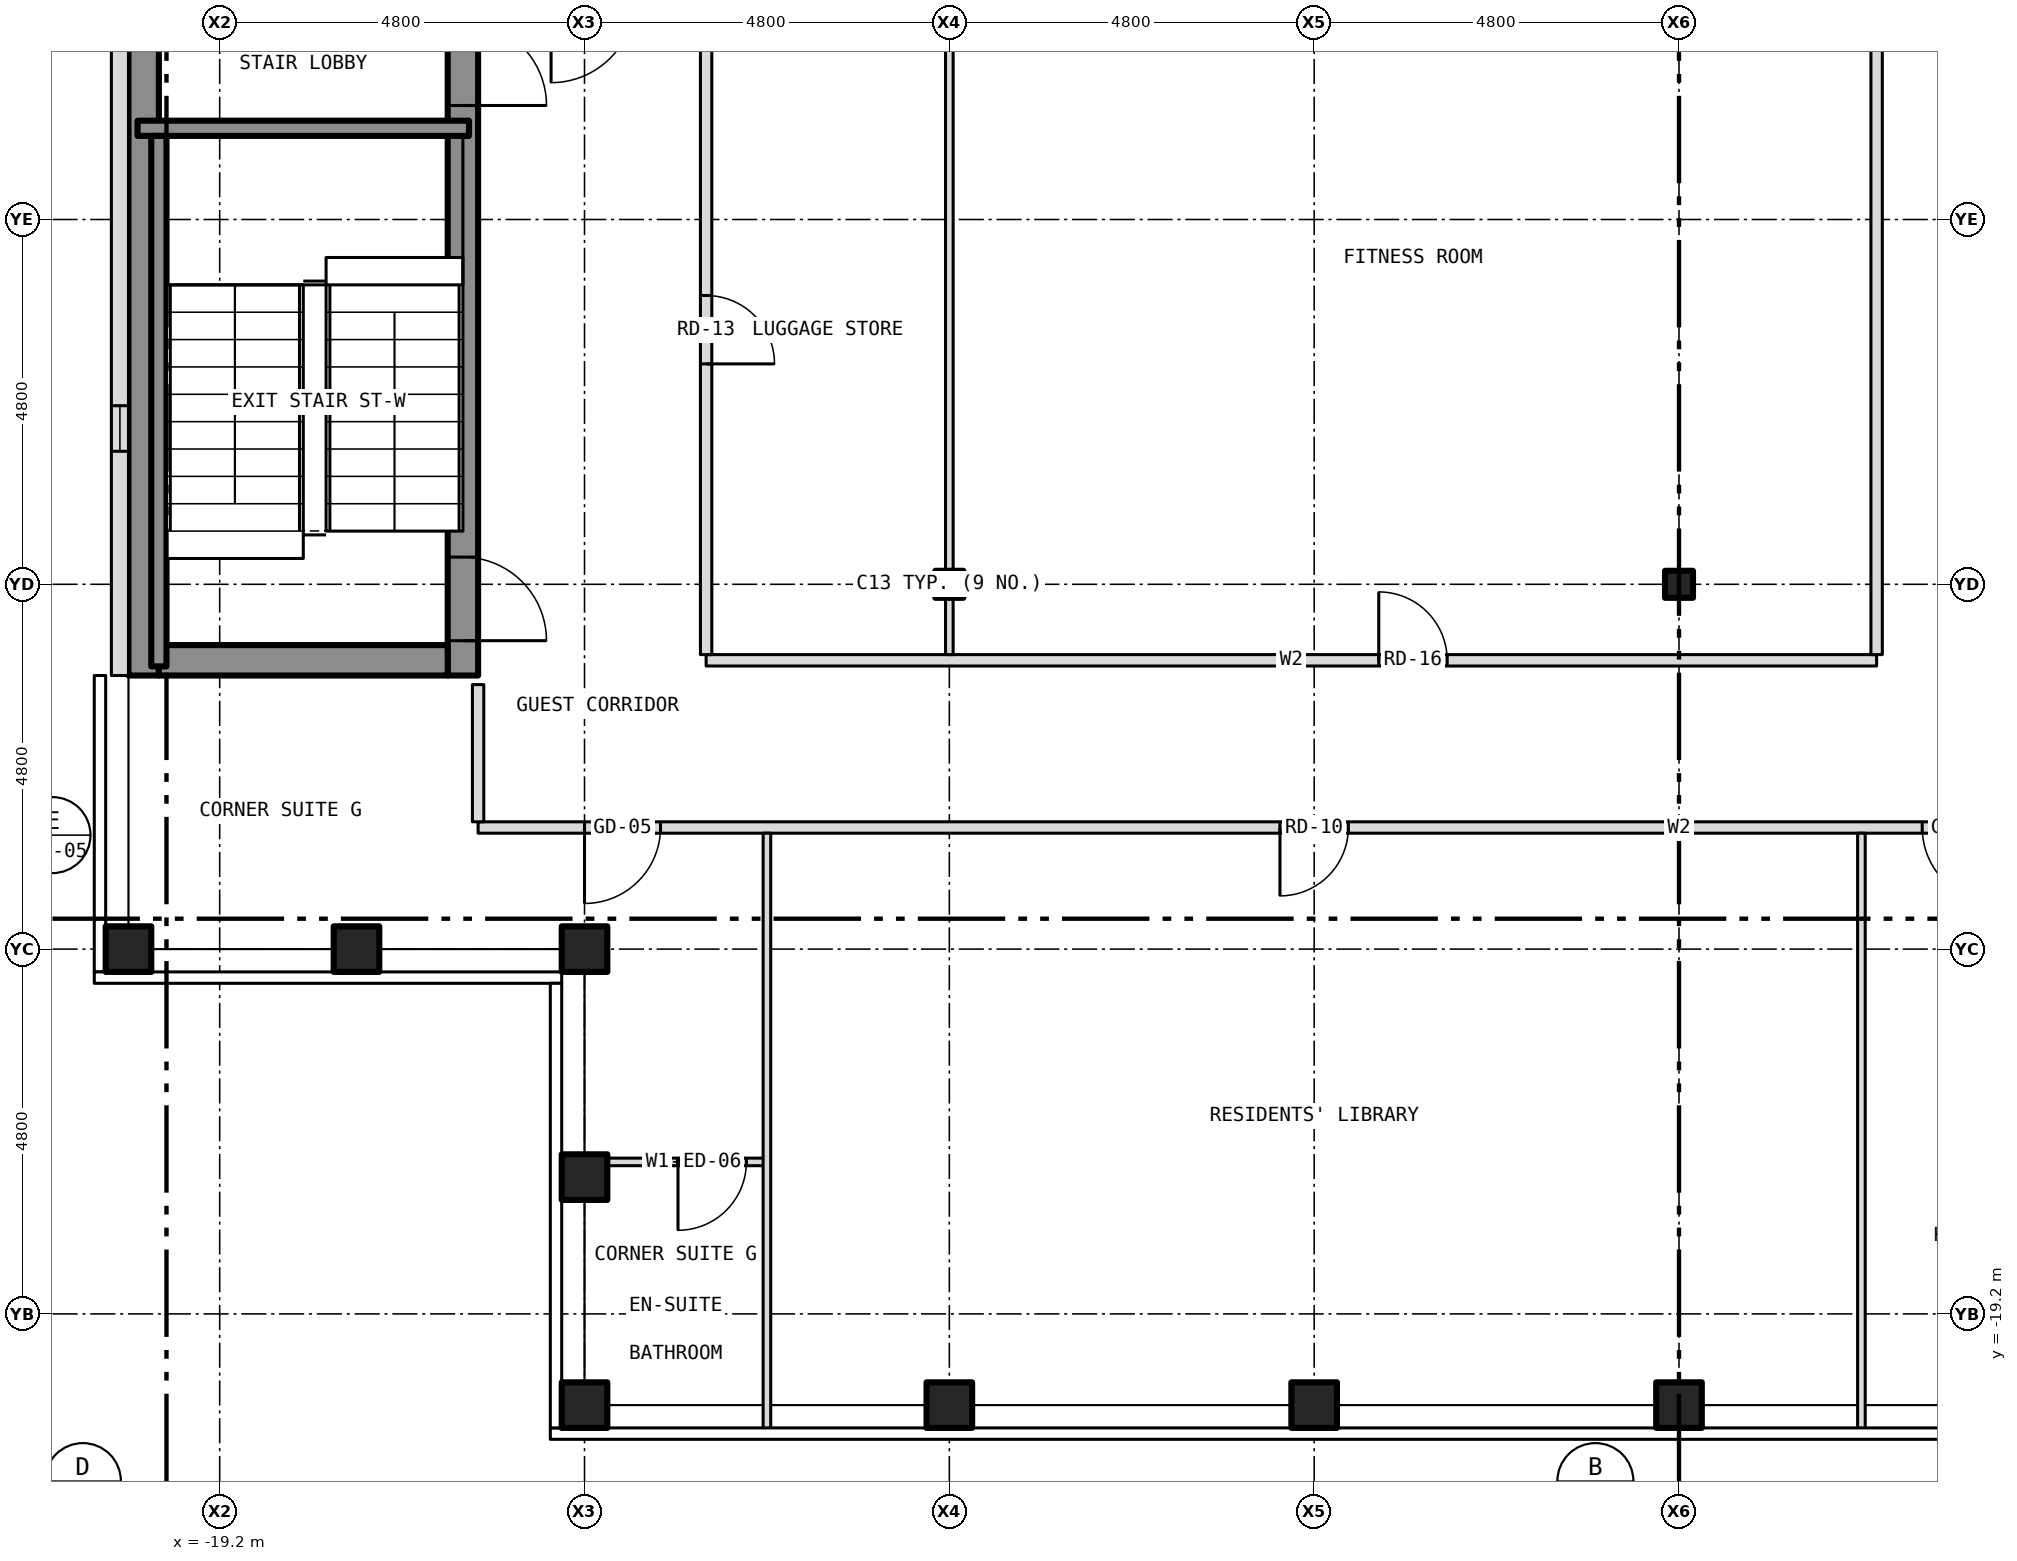
"""IFC4 building model, lengths in metres.
Left out: names, types, materials, properties, quantities, classifications, styles, units other than length and angle.
Written with IfcOpenShell. Run it as: python <this file> out.ifc"""

import sys

from ifc_helpers import new_model, si_unit, direction, frame, frame_2d, origin, origin_2d, place, context, subcontext, project, spatial, rectangle, hollow_rectangle, i_section, extrude, element, fill, save


model = new_model("IFC4")
c1 = context("Model", 3, precision=1e-05, world=origin(), true_north=direction((0.0, 1.0)))
c2 = subcontext(c1, "Body", "Model", "MODEL_VIEW")
j1 = project(units=[si_unit("LENGTHUNIT", "METRE"), si_unit("PLANEANGLEUNIT", "RADIAN")], contexts=[c1])
p1 = place(None, origin())
s1 = spatial("IfcSite", under=j1, at=p1, CompositionType="ELEMENT")
p2 = place(p1, origin())
s2 = spatial("IfcBuilding", under=s1, at=p2, CompositionType="ELEMENT")
p3 = place(p2, frame((0.0, 0.0, 251.5)))
s3 = spatial("IfcBuildingStorey", under=s2, at=p3, CompositionType="ELEMENT", Elevation=251.5)
for number, where, z_axis, x_axis in (
    (1, (-14.4, -20.4, -0.15), (0.0, 0.0, 1.0), (1.0, 0.0, 0.0)),
    (2, (-9.6, -20.4, -0.15), (0.0, 0.0, 1.0), (1.0, 0.0, 0.0)),
    (3, (-4.8, -20.4, -0.15), (0.0, 0.0, 1.0), (1.0, 0.0, 0.0)),
    (4, (0.0, -20.4, -0.15), (0.0, 0.0, 1.0), (1.0, 0.0, 0.0)),
    (5, (-20.4, -14.4, -0.15), (0.0, 0.0, 1.0), (1.0, 0.0, 0.0)),
    (6, (-14.4, -14.4, -0.15), (0.0, 0.0, 1.0), (1.0, 0.0, 0.0)),
    (7, (-14.4, -17.4, -0.15), (0.0, 0.0, 1.0), (1.0, 0.0, 0.0)),
    (8, (-17.4, -14.4, -0.15), (0.0, 0.0, 1.0), (1.0, 0.0, 0.0)),
):
    element("IfcColumn", number, at=place(p3, frame(where, z_axis=z_axis, x_axis=x_axis)), inside=s3, PredefinedType="COLUMN", context=c2, shape_type="SweptSolid", body=[
        extrude(hollow_rectangle(XDim=0.6, YDim=0.6, WallThickness=0.03, at=origin_2d()), origin(), (0.0, 0.0, 1.0), 3.5),
    ])
for number, where, z_axis, x_axis in (
    (9, (-9.6, -9.6, -0.15), (0.0, 0.0, 1.0), (1.0, 0.0, 0.0)),
    (10, (0.0, -9.6, -0.15), (0.0, 0.0, 1.0), (1.0, 0.0, 0.0)),
):
    element("IfcColumn", number, at=place(p3, frame(where, z_axis=z_axis, x_axis=x_axis)), inside=s3, PredefinedType="COLUMN", context=c2, shape_type="SweptSolid", body=[
        extrude(i_section(OverallWidth=0.368, OverallDepth=0.356, WebThickness=0.011, FlangeThickness=0.018, at=origin_2d()), origin(), (0.0, 0.0, 1.0), 3.5),
    ])
p4 = place(p3, frame((-16.0, -10.8, 0.0), z_axis=(0.0, 0.0, 1.0), x_axis=(0.0, 1.0, 0.0)))
e11 = element("IfcWall", 11, at=p4, inside=s3, PredefinedType="SHEAR", context=c2, shape_type="SweptSolid", body=[
    extrude(rectangle(XDim=21.6, YDim=0.4, at=frame_2d((10.8, 0.0))), origin(), (0.0, 0.0, 1.0), 3.25),
])
p5 = place(p4, frame((9.4, 0.0, 0.0)))
e12 = element("IfcOpeningElement", 12, at=p5, cuts=e11, PredefinedType="OPENING", context=c2, shape_type="SweptSolid", body=[
    extrude(rectangle(XDim=1.1, YDim=2.1, at=frame_2d((0.55, 1.05))), frame((0.0, 0.212, 0.0), z_axis=(0.0, -1.0, 0.0), x_axis=(1.0, 0.0, 0.0)), (0.0, 0.0, 1.0), 0.424),
])
p6 = place(p4, frame((11.5, 0.0, 0.0)))
e13 = element("IfcOpeningElement", 13, at=p6, cuts=e11, PredefinedType="OPENING", context=c2, shape_type="SweptSolid", body=[
    extrude(rectangle(XDim=1.1, YDim=2.1, at=frame_2d((0.55, 1.05))), frame((0.0, 0.212, 0.0), z_axis=(0.0, -1.0, 0.0), x_axis=(1.0, 0.0, 0.0)), (0.0, 0.0, 1.0), 0.424),
])
p7 = place(p4, frame((13.6, 0.0, 0.0)))
e14 = element("IfcOpeningElement", 14, at=p7, cuts=e11, PredefinedType="OPENING", context=c2, shape_type="SweptSolid", body=[
    extrude(rectangle(XDim=1.1, YDim=2.1, at=frame_2d((0.55, 1.05))), frame((0.0, 0.212, 0.0), z_axis=(0.0, -1.0, 0.0), x_axis=(1.0, 0.0, 0.0)), (0.0, 0.0, 1.0), 0.424),
])
p8 = place(p4, frame((15.7, 0.0, 0.0)))
e15 = element("IfcOpeningElement", 15, at=p8, cuts=e11, PredefinedType="OPENING", context=c2, shape_type="SweptSolid", body=[
    extrude(rectangle(XDim=1.1, YDim=2.1, at=frame_2d((0.55, 1.05))), frame((0.0, 0.212, 0.0), z_axis=(0.0, -1.0, 0.0), x_axis=(1.0, 0.0, 0.0)), (0.0, 0.0, 1.0), 0.424),
])
p9 = place(p4, frame((17.8, 0.0, 0.0)))
e16 = element("IfcOpeningElement", 16, at=p9, cuts=e11, PredefinedType="OPENING", context=c2, shape_type="SweptSolid", body=[
    extrude(rectangle(XDim=1.1, YDim=2.1, at=frame_2d((0.55, 1.05))), frame((0.0, 0.212, 0.0), z_axis=(0.0, -1.0, 0.0), x_axis=(1.0, 0.0, 0.0)), (0.0, 0.0, 1.0), 0.424),
])
p10 = place(p4, frame((0.458, 0.0, 0.0)))
e17 = element("IfcOpeningElement", 17, at=p10, cuts=e11, PredefinedType="OPENING", context=c2, shape_type="SweptSolid", body=[
    extrude(rectangle(XDim=1.1, YDim=2.1, at=frame_2d((0.55, 1.05))), frame((0.0, 0.212, 0.0), z_axis=(0.0, -1.0, 0.0), x_axis=(1.0, 0.0, 0.0)), (0.0, 0.0, 1.0), 0.424),
])
p11 = place(p4, frame((7.5, 0.0, 0.0)))
e18 = element("IfcOpeningElement", 18, at=p11, cuts=e11, PredefinedType="OPENING", context=c2, shape_type="SweptSolid", body=[
    extrude(rectangle(XDim=1.1, YDim=2.1, at=frame_2d((0.55, 1.05))), frame((0.0, 0.212, 0.0), z_axis=(0.0, -1.0, 0.0), x_axis=(1.0, 0.0, 0.0)), (0.0, 0.0, 1.0), 0.424),
])
p12 = place(p4, frame((20.0, 0.0, 0.0)))
e19 = element("IfcOpeningElement", 19, at=p12, cuts=e11, PredefinedType="OPENING", context=c2, shape_type="SweptSolid", body=[
    extrude(rectangle(XDim=0.9, YDim=2.1, at=frame_2d((0.45, 1.05))), frame((0.0, 0.212, 0.0), z_axis=(0.0, -1.0, 0.0), x_axis=(1.0, 0.0, 0.0)), (0.0, 0.0, 1.0), 0.424),
])
p13 = place(p3, frame((-20.2, -10.8, 0.0), z_axis=(0.0, 0.0, 1.0), x_axis=(0.0, 1.0, 0.0)))
e20 = element("IfcWall", 20, at=p13, inside=s3, PredefinedType="SHEAR", context=c2, shape_type="SweptSolid", body=[
    extrude(rectangle(XDim=21.6, YDim=0.4, at=frame_2d((10.8, 0.0))), origin(), (0.0, 0.0, 1.0), 3.25),
])
p14 = place(p3, frame((-20.0, -10.6, 0.0), z_axis=(0.0, 0.0, 1.0), x_axis=(1.0, 0.0, 0.0)))
e21 = element("IfcWall", 21, at=p14, inside=s3, PredefinedType="SHEAR", context=c2, shape_type="SweptSolid", body=[
    extrude(rectangle(XDim=3.8, YDim=0.4, at=frame_2d((1.9, 0.0))), origin(), (0.0, 0.0, 1.0), 3.25),
])
p15 = place(p3, frame((-20.512, 10.8, 0.0), z_axis=(0.0, 0.0, 1.0), x_axis=(0.0, -1.0, 0.0)))
e22 = element("IfcWall", 22, at=p15, inside=s3, PredefinedType="SOLIDWALL", context=c2, shape_type="SweptSolid", body=[
    extrude(rectangle(XDim=21.6, YDim=0.225, at=frame_2d((10.8, 0.0))), origin(), (0.0, 0.0, 1.0), 3.5),
])
p16 = place(p15, frame((18.05, 0.0, 1.0)))
e23 = element("IfcOpeningElement", 23, at=p16, cuts=e22, PredefinedType="OPENING", context=c2, shape_type="SweptSolid", body=[
    extrude(rectangle(XDim=0.6, YDim=1.5, at=frame_2d((0.3, 0.75))), frame((0.0, 0.125, 0.0), z_axis=(0.0, -1.0, 0.0), x_axis=(1.0, 0.0, 0.0)), (0.0, 0.0, 1.0), 0.249),
])
p17 = place(p3, frame((-14.28, -17.2, 0.0), z_axis=(0.0, 0.0, 1.0), x_axis=(1.0, 0.0, 0.0)))
e24 = element("IfcWall", 24, at=p17, inside=s3, PredefinedType="PARTITIONING", context=c2, shape_type="SweptSolid", body=[
    extrude(rectangle(XDim=2.28, YDim=0.1, at=frame_2d((1.14, 0.0))), origin(), (0.0, 0.0, 1.0), 3.35),
])
p18 = place(p17, frame((1.11, 0.0, 0.0)))
e25 = element("IfcOpeningElement", 25, at=p18, cuts=e24, PredefinedType="OPENING", context=c2, shape_type="SweptSolid", body=[
    extrude(rectangle(XDim=0.9, YDim=2.1, at=frame_2d((0.45, 1.05))), frame((0.0, 0.062, 0.0), z_axis=(0.0, -1.0, 0.0), x_axis=(1.0, 0.0, 0.0)), (0.0, 0.0, 1.0), 0.124),
])
p19 = place(p3, frame((-15.8, -12.8, 0.0), z_axis=(0.0, 0.0, 1.0), x_axis=(1.0, 0.0, 0.0)))
e26 = element("IfcWall", 26, at=p19, inside=s3, PredefinedType="PARTITIONING", context=c2, shape_type="SweptSolid", body=[
    extrude(rectangle(XDim=31.6, YDim=0.15, at=frame_2d((15.8, 0.0))), origin(), (0.0, 0.0, 1.0), 3.35),
])
p20 = place(p19, frame((10.55, 0.0, 0.0)))
e27 = element("IfcOpeningElement", 27, at=p20, cuts=e26, PredefinedType="OPENING", context=c2, shape_type="SweptSolid", body=[
    extrude(rectangle(XDim=0.9, YDim=2.1, at=frame_2d((0.45, 1.05))), frame((0.0, 0.087, 0.0), z_axis=(0.0, -1.0, 0.0), x_axis=(1.0, 0.0, 0.0)), (0.0, 0.0, 1.0), 0.174),
])
p21 = place(p19, frame((19.0, 0.0, 0.0)))
e28 = element("IfcOpeningElement", 28, at=p21, cuts=e26, PredefinedType="OPENING", context=c2, shape_type="SweptSolid", body=[
    extrude(rectangle(XDim=1.0, YDim=2.1, at=frame_2d((0.5, 1.05))), frame((0.0, 0.087, 0.0), z_axis=(0.0, -1.0, 0.0), x_axis=(1.0, 0.0, 0.0)), (0.0, 0.0, 1.0), 0.174),
])
p22 = place(p19, frame((24.95, 0.0, 0.0)))
e29 = element("IfcOpeningElement", 29, at=p22, cuts=e26, PredefinedType="OPENING", context=c2, shape_type="SweptSolid", body=[
    extrude(rectangle(XDim=0.9, YDim=2.1, at=frame_2d((0.45, 1.05))), frame((0.0, 0.087, 0.0), z_axis=(0.0, -1.0, 0.0), x_axis=(1.0, 0.0, 0.0)), (0.0, 0.0, 1.0), 0.174),
])
p23 = place(p19, frame((1.4, 0.0, 0.0)))
e30 = element("IfcOpeningElement", 30, at=p23, cuts=e26, PredefinedType="OPENING", context=c2, shape_type="SweptSolid", body=[
    extrude(rectangle(XDim=1.0, YDim=2.1, at=frame_2d((0.5, 1.05))), frame((0.0, 0.087, 0.0), z_axis=(0.0, -1.0, 0.0), x_axis=(1.0, 0.0, 0.0)), (0.0, 0.0, 1.0), 0.174),
])
p24 = place(p19, frame((29.2, 0.0, 0.0)))
e31 = element("IfcOpeningElement", 31, at=p24, cuts=e26, PredefinedType="OPENING", context=c2, shape_type="SweptSolid", body=[
    extrude(rectangle(XDim=1.0, YDim=2.1, at=frame_2d((0.5, 1.05))), frame((0.0, 0.087, 0.0), z_axis=(0.0, -1.0, 0.0), x_axis=(1.0, 0.0, 0.0)), (0.0, 0.0, 1.0), 0.174),
])
p25 = place(p3, frame((-12.8, -10.6, 0.0), z_axis=(0.0, 0.0, 1.0), x_axis=(1.0, 0.0, 0.0)))
e32 = element("IfcWall", 32, at=p25, inside=s3, PredefinedType="PARTITIONING", context=c2, shape_type="SweptSolid", body=[
    extrude(rectangle(XDim=15.4, YDim=0.15, at=frame_2d((7.7, 0.0))), origin(), (0.0, 0.0, 1.0), 3.35),
])
p26 = place(p25, frame((8.85, 0.0, 0.0)))
e33 = element("IfcOpeningElement", 33, at=p26, cuts=e32, PredefinedType="OPENING", context=c2, shape_type="SweptSolid", body=[
    extrude(rectangle(XDim=0.9, YDim=2.1, at=frame_2d((0.45, 1.05))), frame((0.0, 0.087, 0.0), z_axis=(0.0, -1.0, 0.0), x_axis=(1.0, 0.0, 0.0)), (0.0, 0.0, 1.0), 0.174),
])
p27 = place(p3, frame((-20.28, -3.6, 0.0), z_axis=(0.0, 0.0, 1.0), x_axis=(1.0, 0.0, 0.0)))
e34 = element("IfcWall", 34, at=p27, inside=s3, PredefinedType="SHEAR", context=c2, shape_type="SweptSolid", body=[
    extrude(rectangle(XDim=4.36, YDim=0.2, at=frame_2d((2.18, 0.0))), origin(), (0.0, 0.0, 1.0), 3.25),
])
p28 = place(p3, frame((-20.0, -10.68, 0.0), z_axis=(0.0, 0.0, 1.0), x_axis=(0.0, 1.0, 0.0)))
e35 = element("IfcWall", 35, at=p28, inside=s3, PredefinedType="SHEAR", context=c2, shape_type="SweptSolid", body=[
    extrude(rectangle(XDim=6.98, YDim=0.2, at=frame_2d((3.49, 0.0))), origin(), (0.0, 0.0, 1.0), 3.25),
])
p29 = place(p3, frame((-15.8, -12.725, 0.0), z_axis=(0.0, 0.0, 1.0), x_axis=(0.0, 1.0, 0.0)))
e36 = element("IfcWall", 36, at=p29, inside=s3, PredefinedType="PARTITIONING", context=c2, shape_type="SweptSolid", body=[
    extrude(rectangle(XDim=1.805, YDim=0.15, at=frame_2d((0.903, 0.0))), origin(), (0.0, 0.0, 1.0), 3.35),
])
p30 = place(p3, frame((-12.8, -10.525, 0.0), z_axis=(0.0, 0.0, 1.0), x_axis=(0.0, 1.0, 0.0)))
e37 = element("IfcWall", 37, at=p30, inside=s3, PredefinedType="PARTITIONING", context=c2, shape_type="SweptSolid", body=[
    extrude(rectangle(XDim=8.525, YDim=0.15, at=frame_2d((4.262, 0.0))), origin(), (0.0, 0.0, 1.0), 3.35),
])
p31 = place(p30, frame((3.825, 0.0, 0.0)))
e38 = element("IfcOpeningElement", 38, at=p31, cuts=e37, PredefinedType="OPENING", context=c2, shape_type="SweptSolid", body=[
    extrude(rectangle(XDim=0.9, YDim=2.1, at=frame_2d((0.45, 1.05))), frame((0.0, 0.087, 0.0), z_axis=(0.0, -1.0, 0.0), x_axis=(1.0, 0.0, 0.0)), (0.0, 0.0, 1.0), 0.174),
])
p32 = place(p3, frame((-12.0, -20.73, 0.0), z_axis=(0.0, 0.0, 1.0), x_axis=(0.0, 1.0, 0.0)))
e39 = element("IfcWall", 39, at=p32, inside=s3, PredefinedType="PARTITIONING", context=c2, shape_type="SweptSolid", body=[
    extrude(rectangle(XDim=7.855, YDim=0.1, at=frame_2d((3.927, 0.0))), origin(), (0.0, 0.0, 1.0), 3.35),
])
p33 = place(p3, frame((-9.6, -10.525, 0.0), z_axis=(0.0, 0.0, 1.0), x_axis=(0.0, 1.0, 0.0)))
e40 = element("IfcWall", 40, at=p33, inside=s3, PredefinedType="PARTITIONING", context=c2, shape_type="SweptSolid", body=[
    extrude(rectangle(XDim=0.741, YDim=0.1, at=frame_2d((0.371, 0.0))), origin(), (0.0, 0.0, 1.0), 2.728),
])
p34 = place(p3, frame((-9.6, -9.784, 0.0), z_axis=(0.0, 0.0, 1.0), x_axis=(0.0, 1.0, 0.0)))
e41 = element("IfcWall", 41, at=p34, inside=s3, PredefinedType="PARTITIONING", context=c2, shape_type="SweptSolid", body=[
    extrude(rectangle(XDim=0.368, YDim=0.1, at=frame_2d((0.184, 0.0))), origin(), (0.0, 0.0, 1.0), 3.35),
])
p35 = place(p3, frame((-9.6, -9.416, 0.0), z_axis=(0.0, 0.0, 1.0), x_axis=(0.0, 1.0, 0.0)))
e42 = element("IfcWall", 42, at=p35, inside=s3, PredefinedType="PARTITIONING", context=c2, shape_type="SweptSolid", body=[
    extrude(rectangle(XDim=9.366, YDim=0.1, at=frame_2d((4.683, 0.0))), origin(), (0.0, 0.0, 1.0), 2.728),
])
p36 = place(p3, frame((2.4, -20.73, 0.0), z_axis=(0.0, 0.0, 1.0), x_axis=(0.0, 1.0, 0.0)))
e43 = element("IfcWall", 43, at=p36, inside=s3, PredefinedType="PARTITIONING", context=c2, shape_type="SweptSolid", body=[
    extrude(rectangle(XDim=7.855, YDim=0.1, at=frame_2d((3.927, 0.0))), origin(), (0.0, 0.0, 1.0), 3.35),
])
p37 = place(p3, frame((2.6, -10.525, 0.0), z_axis=(0.0, 0.0, 1.0), x_axis=(0.0, 1.0, 0.0)))
e44 = element("IfcWall", 44, at=p37, inside=s3, PredefinedType="PARTITIONING", context=c2, shape_type="SweptSolid", body=[
    extrude(rectangle(XDim=16.35, YDim=0.15, at=frame_2d((8.175, 0.0))), origin(), (0.0, 0.0, 1.0), 3.35),
])
p38 = place(p16, origin())
e45 = element("IfcWindow", 45, at=p38, inside=s3, PartitioningType="SINGLE_PANEL", PredefinedType="WINDOW", context=c2, shape_type="SweptSolid", body=[
    extrude(rectangle(XDim=0.6, YDim=1.5, at=frame_2d((0.3, 0.75))), frame((0.0, -0.022, 0.0), z_axis=(0.0, -1.0, 0.0), x_axis=(1.0, 0.0, 0.0)), (0.0, 0.0, 1.0), 0.06),
])
fill(e23, e45)
p39 = place(p10, origin())
e46 = element("IfcDoor", 46, at=p39, inside=s3, OperationType="SINGLE_SWING_LEFT", PredefinedType="DOOR", context=c2, shape_type="SweptSolid", body=[
    extrude(rectangle(XDim=1.1, YDim=2.1, at=frame_2d((0.55, 1.05))), frame((0.0, 0.025, 0.0), z_axis=(0.0, -1.0, 0.0), x_axis=(1.0, 0.0, 0.0)), (0.0, 0.0, 1.0), 0.05),
])
fill(e17, e46)
p40 = place(p11, origin())
e47 = element("IfcDoor", 47, at=p40, inside=s3, OperationType="SINGLE_SWING_LEFT", PredefinedType="DOOR", context=c2, shape_type="SweptSolid", body=[
    extrude(rectangle(XDim=1.1, YDim=2.1, at=frame_2d((0.55, 1.05))), frame((0.0, 0.025, 0.0), z_axis=(0.0, -1.0, 0.0), x_axis=(1.0, 0.0, 0.0)), (0.0, 0.0, 1.0), 0.05),
])
fill(e18, e47)
p41 = place(p20, origin())
e48 = element("IfcDoor", 48, at=p41, inside=s3, OperationType="SINGLE_SWING_LEFT", PredefinedType="DOOR", context=c2, shape_type="SweptSolid", body=[
    extrude(rectangle(XDim=0.9, YDim=2.1, at=frame_2d((0.45, 1.05))), frame((0.0, 0.025, 0.0), z_axis=(0.0, -1.0, 0.0), x_axis=(1.0, 0.0, 0.0)), (0.0, 0.0, 1.0), 0.05),
])
fill(e27, e48)
p42 = place(p21, origin())
e49 = element("IfcDoor", 49, at=p42, inside=s3, OperationType="SINGLE_SWING_RIGHT", PredefinedType="DOOR", context=c2, shape_type="SweptSolid", body=[
    extrude(rectangle(XDim=1.0, YDim=2.1, at=frame_2d((0.5, 1.05))), frame((0.0, 0.025, 0.0), z_axis=(0.0, -1.0, 0.0), x_axis=(1.0, 0.0, 0.0)), (0.0, 0.0, 1.0), 0.05),
])
fill(e28, e49)
p43 = place(p18, origin())
e50 = element("IfcDoor", 50, at=p43, inside=s3, OperationType="SINGLE_SWING_LEFT", PredefinedType="DOOR", context=c2, shape_type="SweptSolid", body=[
    extrude(rectangle(XDim=0.9, YDim=2.1, at=frame_2d((0.45, 1.05))), frame((0.0, 0.025, 0.0), z_axis=(0.0, -1.0, 0.0), x_axis=(1.0, 0.0, 0.0)), (0.0, 0.0, 1.0), 0.05),
])
fill(e25, e50)
p44 = place(p23, origin())
e51 = element("IfcDoor", 51, at=p44, inside=s3, OperationType="SINGLE_SWING_LEFT", PredefinedType="DOOR", context=c2, shape_type="SweptSolid", body=[
    extrude(rectangle(XDim=1.0, YDim=2.1, at=frame_2d((0.5, 1.05))), frame((0.0, 0.025, 0.0), z_axis=(0.0, -1.0, 0.0), x_axis=(1.0, 0.0, 0.0)), (0.0, 0.0, 1.0), 0.05),
])
fill(e30, e51)
p45 = place(p31, origin())
e52 = element("IfcDoor", 52, at=p45, inside=s3, OperationType="SINGLE_SWING_LEFT", PredefinedType="DOOR", context=c2, shape_type="SweptSolid", body=[
    extrude(rectangle(XDim=0.9, YDim=2.1, at=frame_2d((0.45, 1.05))), frame((0.0, 0.025, 0.0), z_axis=(0.0, -1.0, 0.0), x_axis=(1.0, 0.0, 0.0)), (0.0, 0.0, 1.0), 0.05),
])
fill(e38, e52)
p46 = place(p26, origin())
e53 = element("IfcDoor", 53, at=p46, inside=s3, OperationType="SINGLE_SWING_LEFT", PredefinedType="DOOR", context=c2, shape_type="SweptSolid", body=[
    extrude(rectangle(XDim=0.9, YDim=2.1, at=frame_2d((0.45, 1.05))), frame((0.0, 0.025, 0.0), z_axis=(0.0, -1.0, 0.0), x_axis=(1.0, 0.0, 0.0)), (0.0, 0.0, 1.0), 0.05),
])
fill(e33, e53)
save(model, sys.argv[1])
